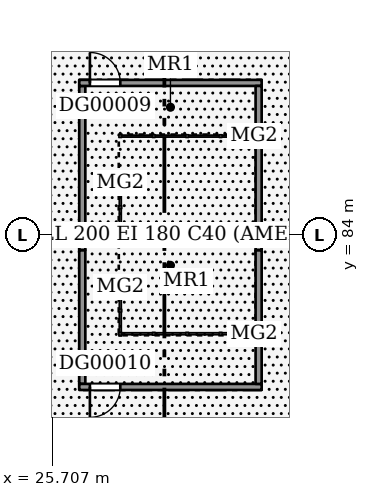
"""IFC4 building model, lengths in metres.
Left out: names, types, materials, properties, quantities, classifications, styles, units other than length and angle.
Written with IfcOpenShell. Run it as: python <this file> out.ifc"""

import sys

from ifc_helpers import new_model, si_unit, direction, frame, frame_2d, origin, place, context, subcontext, project, spatial, rectangle, extrude, element, fill, save


model = new_model("IFC4")
c1 = context("Model", 3, precision=1e-05, world=origin(), true_north=direction((0.0, 1.0)))
c2 = subcontext(c1, "Body", "Model", "MODEL_VIEW")
j1 = project(units=[si_unit("LENGTHUNIT", "METRE"), si_unit("PLANEANGLEUNIT", "RADIAN")], contexts=[c1])
p1 = place(None, origin())
s1 = spatial("IfcSite", under=j1, at=p1, CompositionType="ELEMENT")
p2 = place(p1, origin())
s2 = spatial("IfcBuilding", under=s1, at=p2, CompositionType="ELEMENT")
p3 = place(p2, origin())
s3 = spatial("IfcBuildingStorey", under=s2, at=p3, CompositionType="ELEMENT", Elevation=0.0)
p4 = place(p3, frame((26.7, 79.1, 0.0), z_axis=(0.0, 0.0, 1.0), x_axis=(0.0, 1.0, 0.0)))
e1 = element("IfcWall", 1, at=p4, inside=s3, PredefinedType="SOLIDWALL", context=c2, shape_type="SweptSolid", body=[
    extrude(rectangle(XDim=4.4, YDim=0.2, at=frame_2d((2.2, 0.0))), origin(), (0.0, 0.0, 1.0), 3.6),
])
p5 = place(p3, frame((26.6, 79.0, 0.0), z_axis=(0.0, 0.0, 1.0), x_axis=(1.0, 0.0, 0.0)))
e2 = element("IfcWall", 2, at=p5, inside=s3, PredefinedType="SOLIDWALL", context=c2, shape_type="SweptSolid", body=[
    extrude(rectangle(XDim=6.0, YDim=0.2, at=frame_2d((3.0, 0.0))), origin(), (0.0, 0.0, 1.0), 3.6),
])
p6 = place(p5, frame((0.35, 0.0, 0.0)))
e3 = element("IfcOpeningElement", 3, at=p6, cuts=e2, PredefinedType="OPENING", context=c2, shape_type="SweptSolid", body=[
    extrude(rectangle(XDim=1.0, YDim=2.1, at=frame_2d((0.5, 1.05))), frame((0.0, 0.11, 0.0), z_axis=(0.0, -1.0, 0.0), x_axis=(1.0, 0.0, 0.0)), (0.0, 0.0, 1.0), 0.22),
])
p7 = place(p3, frame((26.7, 83.5, 0.0), z_axis=(0.0, 0.0, 1.0), x_axis=(0.0, 1.0, 0.0)))
e4 = element("IfcWall", 4, at=p7, inside=s3, PredefinedType="SOLIDWALL", context=c2, shape_type="SweptSolid", body=[
    extrude(rectangle(XDim=0.4, YDim=0.2, at=frame_2d((0.2, 0.0))), origin(), (0.0, 0.0, 1.0), 3.6),
])
p8 = place(p3, frame((26.7, 84.1, 0.0), z_axis=(0.0, 0.0, 1.0), x_axis=(0.0, 1.0, 0.0)))
e5 = element("IfcWall", 5, at=p8, inside=s3, PredefinedType="SOLIDWALL", context=c2, shape_type="SweptSolid", body=[
    extrude(rectangle(XDim=4.8, YDim=0.2, at=frame_2d((2.4, 0.0))), origin(), (0.0, 0.0, 1.0), 3.6),
])
p9 = place(p3, frame((26.6, 84.0, 0.0), z_axis=(0.0, 0.0, 1.0), x_axis=(1.0, 0.0, 0.0)))
e6 = element("IfcWall", 6, at=p9, inside=s3, PredefinedType="SOLIDWALL", context=c2, shape_type="SweptSolid", body=[
    extrude(rectangle(XDim=6.0, YDim=0.2, at=frame_2d((3.0, 0.0))), origin(), (0.0, 0.0, 1.0), 3.6),
])
p10 = place(p3, frame((26.6, 89.0, 0.0), z_axis=(0.0, 0.0, 1.0), x_axis=(1.0, 0.0, 0.0)))
e7 = element("IfcWall", 7, at=p10, inside=s3, PredefinedType="SOLIDWALL", context=c2, shape_type="SweptSolid", body=[
    extrude(rectangle(XDim=6.0, YDim=0.2, at=frame_2d((3.0, 0.0))), origin(), (0.0, 0.0, 1.0), 3.6),
])
p11 = place(p10, frame((0.35, 0.0, 0.0)))
e8 = element("IfcOpeningElement", 8, at=p11, cuts=e7, PredefinedType="OPENING", context=c2, shape_type="SweptSolid", body=[
    extrude(rectangle(XDim=1.0, YDim=2.1, at=frame_2d((0.5, 1.05))), frame((0.0, 0.11, 0.0), z_axis=(0.0, -1.0, 0.0), x_axis=(1.0, 0.0, 0.0)), (0.0, 0.0, 1.0), 0.22),
])
p12 = place(p3, frame((32.5, 79.1, 0.0), z_axis=(0.0, 0.0, 1.0), x_axis=(0.0, 1.0, 0.0)))
e9 = element("IfcWall", 9, at=p12, inside=s3, PredefinedType="SOLIDWALL", context=c2, shape_type="SweptSolid", body=[
    extrude(rectangle(XDim=4.4, YDim=0.2, at=frame_2d((2.2, 0.0))), origin(), (0.0, 0.0, 1.0), 3.6),
])
p13 = place(p3, frame((32.5, 83.5, 0.0), z_axis=(0.0, 0.0, 1.0), x_axis=(0.0, 1.0, 0.0)))
e10 = element("IfcWall", 10, at=p13, inside=s3, PredefinedType="SOLIDWALL", context=c2, shape_type="SweptSolid", body=[
    extrude(rectangle(XDim=0.4, YDim=0.2, at=frame_2d((0.2, 0.0))), origin(), (0.0, 0.0, 1.0), 3.6),
])
p14 = place(p3, frame((32.5, 84.1, 0.0), z_axis=(0.0, 0.0, 1.0), x_axis=(0.0, 1.0, 0.0)))
e11 = element("IfcWall", 11, at=p14, inside=s3, PredefinedType="SOLIDWALL", context=c2, shape_type="SweptSolid", body=[
    extrude(rectangle(XDim=4.8, YDim=0.2, at=frame_2d((2.4, 0.0))), origin(), (0.0, 0.0, 1.0), 3.6),
])
p15 = place(p11, origin())
e12 = element("IfcDoor", 12, at=p15, inside=s3, OperationType="SINGLE_SWING_LEFT", PredefinedType="DOOR", context=c2, shape_type="SweptSolid", body=[
    extrude(rectangle(XDim=1.0, YDim=2.1, at=frame_2d((0.5, 1.05))), frame((0.0, 0.025, 0.0), z_axis=(0.0, -1.0, 0.0), x_axis=(1.0, 0.0, 0.0)), (0.0, 0.0, 1.0), 0.05),
])
fill(e8, e12)
p16 = place(p6, frame((1.0, 0.0, 0.0), z_axis=(0.0, 0.0, 1.0), x_axis=(-1.0, 0.0, 0.0)))
e13 = element("IfcDoor", 13, at=p16, inside=s3, OperationType="SINGLE_SWING_RIGHT", PredefinedType="DOOR", context=c2, shape_type="SweptSolid", body=[
    extrude(rectangle(XDim=1.0, YDim=2.1, at=frame_2d((0.5, 1.05))), frame((0.0, 0.025, 0.0), z_axis=(0.0, -1.0, 0.0), x_axis=(1.0, 0.0, 0.0)), (0.0, 0.0, 1.0), 0.05),
])
fill(e3, e13)
save(model, sys.argv[1])
